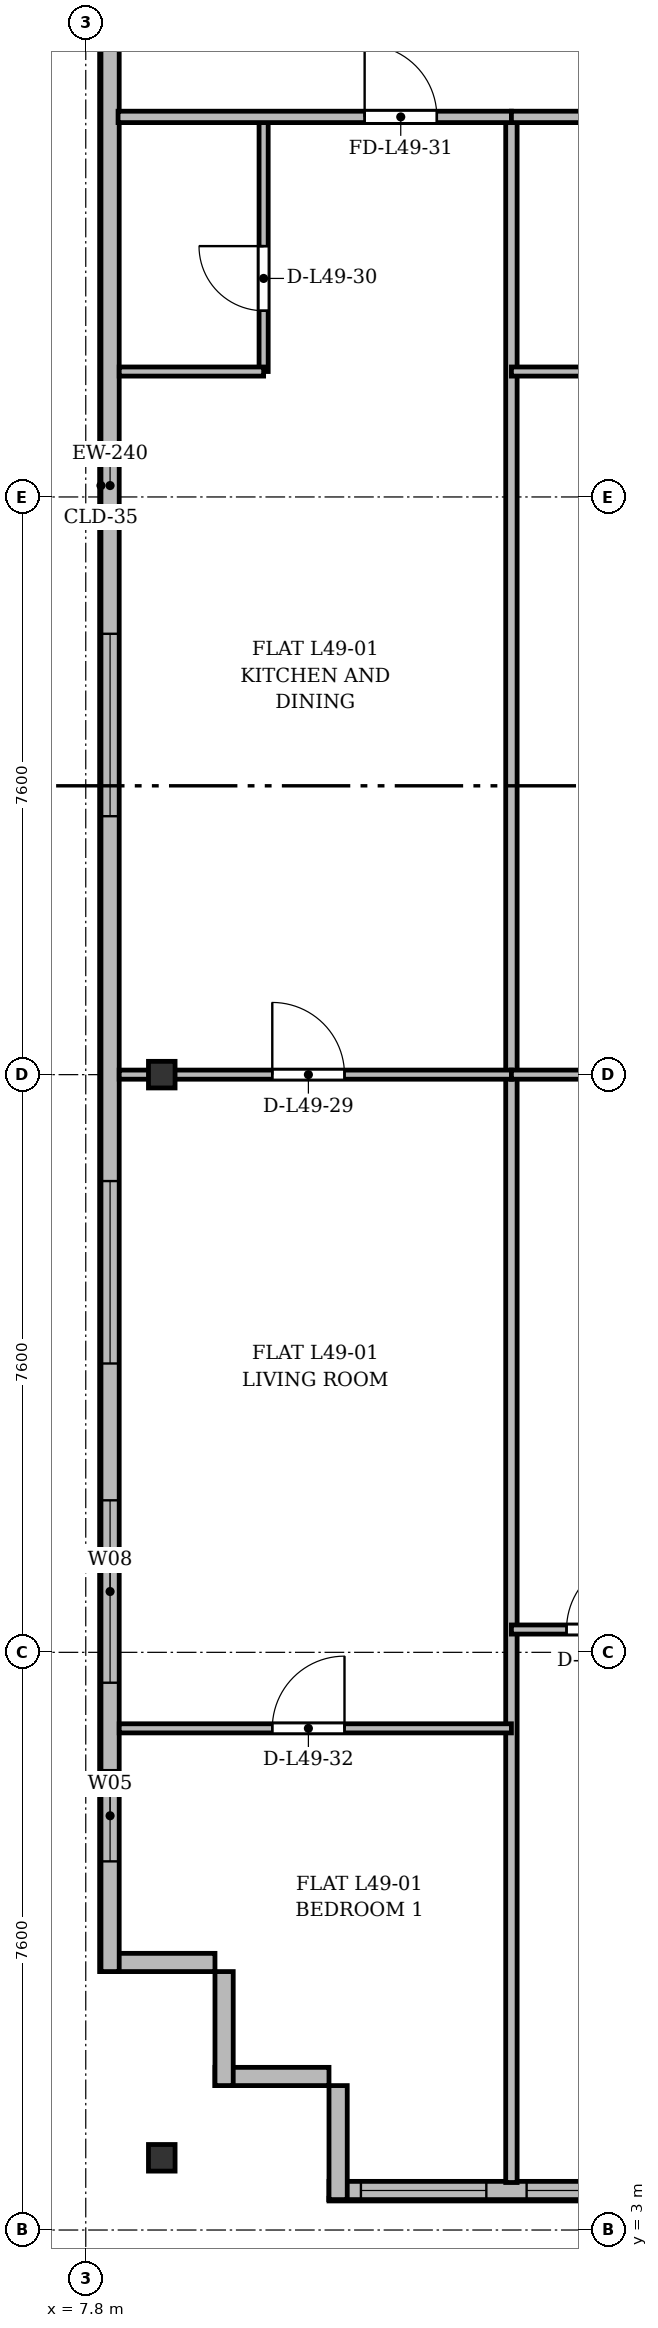
"""IFC4 building model, lengths in metres.
Left out: names, types, materials, properties, quantities, classifications, styles, units other than length and angle.
Written with IfcOpenShell. Run it as: python <this file> out.ifc"""

import sys

from ifc_helpers import new_model, si_unit, direction, frame, frame_2d, origin, origin_2d, place, context, subcontext, project, spatial, rectangle, i_section, extrude, source, transform, mapped, element, fill, save


model = new_model("IFC4")
c1 = context("Model", 3, precision=1e-05, world=origin(), true_north=direction((0.0, 1.0)))
c2 = subcontext(c1, "Body", "Model", "MODEL_VIEW")
j1 = project(units=[si_unit("LENGTHUNIT", "METRE"), si_unit("PLANEANGLEUNIT", "RADIAN")], contexts=[c1])
p1 = place(None, origin())
s1 = spatial("IfcSite", under=j1, at=p1, CompositionType="ELEMENT")
p2 = place(p1, origin())
s2 = spatial("IfcBuilding", under=s1, at=p2, CompositionType="ELEMENT")
p3 = place(p2, frame((0.0, 0.0, 190.5)))
s3 = spatial("IfcBuildingStorey", under=s2, at=p3, CompositionType="ELEMENT", Elevation=190.5)
m1 = source(origin(), c2, "Body", "SweptSolid", [
    extrude(i_section(OverallWidth=0.35, OverallDepth=0.35, WebThickness=0.018, FlangeThickness=0.028, at=origin_2d()), origin(), (0.0, 0.0, 1.0), 3.6),
])
for number, where, z_axis, x_axis in (
    (1, (8.8, 3.95, 0.0), (0.0, 0.0, 1.0), (1.0, 0.0, 0.0)),
    (2, (8.8, 18.2, 0.0), (0.0, 0.0, 1.0), (1.0, 0.0, 0.0)),
):
    element("IfcColumn", number, at=place(p3, frame(where, z_axis=z_axis, x_axis=x_axis)), inside=s3, PredefinedType="COLUMN", context=c2, shape_type="MappedRepresentation", body=[
        mapped(m1, transform((0.0, 0.0, 0.0), x_axis=(1.0, 0.0, 0.0), y_axis=(0.0, 1.0, 0.0), z_axis=(0.0, 0.0, 1.0), scale=1.0)),
    ])
for number, where, z_axis, x_axis in (
    (3, (11.0, 5.02, 0.0), (0.0, 0.0, 1.0), (-1.0, 0.0, 0.0)),
    (4, (9.62, 4.9, 0.0), (0.0, 0.0, 1.0), (0.0, 1.0, 0.0)),
):
    element("IfcWall", number, at=place(p3, frame(where, z_axis=z_axis, x_axis=x_axis)), inside=s3, PredefinedType="SOLIDWALL", context=c2, shape_type="SweptSolid", body=[
        extrude(rectangle(XDim=1.5, YDim=0.24, at=frame_2d((0.75, 0.0))), origin(), (0.0, 0.0, 1.0), 3.36),
    ])
p4 = place(p3, frame((9.5, 6.52, 0.0), z_axis=(0.0, 0.0, 1.0), x_axis=(-1.0, 0.0, 0.0)))
e5 = element("IfcWall", 5, at=p4, inside=s3, PredefinedType="SOLIDWALL", context=c2, shape_type="SweptSolid", body=[
    extrude(rectangle(XDim=1.5, YDim=0.24, at=frame_2d((0.75, 0.0))), origin(), (0.0, 0.0, 1.0), 2.86),
])
p5 = place(p3, frame((8.12, 6.4, 0.0), z_axis=(0.0, 0.0, 1.0), x_axis=(0.0, 1.0, 0.0)))
e6 = element("IfcWall", 6, at=p5, inside=s3, PredefinedType="SOLIDWALL", context=c2, shape_type="SweptSolid", body=[
    extrude(rectangle(XDim=39.1, YDim=0.24, at=frame_2d((19.55, 0.0))), origin(), (0.0, 0.0, 1.0), 3.36),
])
p6 = place(p5, frame((1.45, 0.0, 0.92)))
e7 = element("IfcOpeningElement", 7, at=p6, cuts=e6, PredefinedType="OPENING", context=c2, shape_type="SweptSolid", body=[
    extrude(rectangle(XDim=1.2, YDim=1.65, at=frame_2d((0.6, 0.825))), frame((0.0, 0.13, 0.0), z_axis=(0.0, -1.0, 0.0), x_axis=(1.0, 0.0, 0.0)), (0.0, 0.0, 1.0), 0.26),
])
p7 = place(p5, frame((3.8, 0.0, 0.92)))
e8 = element("IfcOpeningElement", 8, at=p7, cuts=e6, PredefinedType="OPENING", context=c2, shape_type="SweptSolid", body=[
    extrude(rectangle(XDim=2.4, YDim=2.1, at=frame_2d((1.2, 1.05))), frame((0.0, 0.13, 0.0), z_axis=(0.0, -1.0, 0.0), x_axis=(1.0, 0.0, 0.0)), (0.0, 0.0, 1.0), 0.26),
])
p8 = place(p5, frame((8.0, 0.0, 0.92)))
e9 = element("IfcOpeningElement", 9, at=p8, cuts=e6, PredefinedType="OPENING", context=c2, shape_type="SweptSolid", body=[
    extrude(rectangle(XDim=2.4, YDim=2.1, at=frame_2d((1.2, 1.05))), frame((0.0, 0.13, 0.0), z_axis=(0.0, -1.0, 0.0), x_axis=(1.0, 0.0, 0.0)), (0.0, 0.0, 1.0), 0.26),
])
p9 = place(p5, frame((15.2, 0.0, 0.92)))
e10 = element("IfcOpeningElement", 10, at=p9, cuts=e6, PredefinedType="OPENING", context=c2, shape_type="SweptSolid", body=[
    extrude(rectangle(XDim=2.4, YDim=2.1, at=frame_2d((1.2, 1.05))), frame((0.0, 0.13, 0.0), z_axis=(0.0, -1.0, 0.0), x_axis=(1.0, 0.0, 0.0)), (0.0, 0.0, 1.0), 0.26),
])
p10 = place(p5, frame((33.4, 0.0, 0.92)))
e11 = element("IfcOpeningElement", 11, at=p10, cuts=e6, PredefinedType="OPENING", context=c2, shape_type="SweptSolid", body=[
    extrude(rectangle(XDim=1.2, YDim=1.65, at=frame_2d((0.6, 0.825))), frame((0.0, 0.13, 0.0), z_axis=(0.0, -1.0, 0.0), x_axis=(1.0, 0.0, 0.0)), (0.0, 0.0, 1.0), 0.26),
])
p11 = place(p5, frame((36.75, 0.0, 0.92)))
e12 = element("IfcOpeningElement", 12, at=p11, cuts=e6, PredefinedType="OPENING", context=c2, shape_type="SweptSolid", body=[
    extrude(rectangle(XDim=1.2, YDim=1.65, at=frame_2d((0.6, 0.825))), frame((0.0, 0.13, 0.0), z_axis=(0.0, -1.0, 0.0), x_axis=(1.0, 0.0, 0.0)), (0.0, 0.0, 1.0), 0.26),
])
p12 = place(p3, frame((30.6, 3.52, 0.0), z_axis=(0.0, 0.0, 1.0), x_axis=(-1.0, 0.0, 0.0)))
e13 = element("IfcWall", 13, at=p12, inside=s3, PredefinedType="SOLIDWALL", context=c2, shape_type="SweptSolid", body=[
    extrude(rectangle(XDim=19.6, YDim=0.24, at=frame_2d((9.8, 0.0))), origin(), (0.0, 0.0, 1.0), 3.36),
])
p13 = place(p12, frame((1.82, 0.0, 0.9)))
e14 = element("IfcOpeningElement", 14, at=p13, cuts=e13, PredefinedType="OPENING", context=c2, shape_type="SweptSolid", body=[
    extrude(rectangle(XDim=1.65, YDim=1.85, at=frame_2d((0.825, 0.925))), frame((0.0, 0.13, 0.0), z_axis=(0.0, -1.0, 0.0), x_axis=(1.0, 0.0, 0.0)), (0.0, 0.0, 1.0), 0.26),
])
p14 = place(p12, frame((6.9, 0.0, 0.9)))
e15 = element("IfcOpeningElement", 15, at=p14, cuts=e13, PredefinedType="OPENING", context=c2, shape_type="SweptSolid", body=[
    extrude(rectangle(XDim=1.8, YDim=1.8, at=frame_2d((0.9, 0.9))), frame((0.0, 0.13, 0.0), z_axis=(0.0, -1.0, 0.0), x_axis=(1.0, 0.0, 0.0)), (0.0, 0.0, 1.0), 0.26),
])
p15 = place(p12, frame((10.855, 0.0, 0.0)))
e16 = element("IfcOpeningElement", 16, at=p15, cuts=e13, PredefinedType="OPENING", context=c2, shape_type="SweptSolid", body=[
    extrude(rectangle(XDim=1.2, YDim=2.2, at=frame_2d((0.6, 1.1))), frame((0.0, 0.13, 0.0), z_axis=(0.0, -1.0, 0.0), x_axis=(1.0, 0.0, 0.0)), (0.0, 0.0, 1.0), 0.26),
])
p16 = place(p12, frame((12.85, 0.0, 0.9)))
e17 = element("IfcOpeningElement", 17, at=p16, cuts=e13, PredefinedType="OPENING", context=c2, shape_type="SweptSolid", body=[
    extrude(rectangle(XDim=1.5, YDim=1.75, at=frame_2d((0.75, 0.875))), frame((0.0, 0.13, 0.0), z_axis=(0.0, -1.0, 0.0), x_axis=(1.0, 0.0, 0.0)), (0.0, 0.0, 1.0), 0.26),
])
p17 = place(p12, frame((15.0, 0.0, 0.9)))
e18 = element("IfcOpeningElement", 18, at=p17, cuts=e13, PredefinedType="OPENING", context=c2, shape_type="SweptSolid", body=[
    extrude(rectangle(XDim=2.0, YDim=1.95, at=frame_2d((1.0, 0.975))), frame((0.0, 0.13, 0.0), z_axis=(0.0, -1.0, 0.0), x_axis=(1.0, 0.0, 0.0)), (0.0, 0.0, 1.0), 0.26),
])
p18 = place(p12, frame((17.53, 0.0, 0.9)))
e19 = element("IfcOpeningElement", 19, at=p18, cuts=e13, PredefinedType="OPENING", context=c2, shape_type="SweptSolid", body=[
    extrude(rectangle(XDim=1.65, YDim=1.85, at=frame_2d((0.825, 0.925))), frame((0.0, 0.13, 0.0), z_axis=(0.0, -1.0, 0.0), x_axis=(1.0, 0.0, 0.0)), (0.0, 0.0, 1.0), 0.26),
])
p19 = place(p3, frame((11.12, 3.4, 0.0), z_axis=(0.0, 0.0, 1.0), x_axis=(0.0, 1.0, 0.0)))
e20 = element("IfcWall", 20, at=p19, inside=s3, PredefinedType="SOLIDWALL", context=c2, shape_type="SweptSolid", body=[
    extrude(rectangle(XDim=1.5, YDim=0.24, at=frame_2d((0.75, 0.0))), origin(), (0.0, 0.0, 1.0), 2.91),
])
p20 = place(p3, frame((13.4, 3.625, 0.0), z_axis=(0.0, 0.0, 1.0), x_axis=(0.0, 1.0, 0.0)))
e21 = element("IfcWall", 21, at=p20, inside=s3, PredefinedType="PARTITIONING", context=c2, shape_type="SweptSolid", body=[
    extrude(rectangle(XDim=27.175, YDim=0.15, at=frame_2d((13.587, 0.0))), origin(), (0.0, 0.0, 1.0), 2.91),
])
p21 = place(p3, frame((8.24, 18.2, 0.0), z_axis=(0.0, 0.0, 1.0), x_axis=(1.0, 0.0, 0.0)))
e22 = element("IfcWall", 22, at=p21, inside=s3, PredefinedType="PARTITIONING", context=c2, shape_type="SweptSolid", body=[
    extrude(rectangle(XDim=5.16, YDim=0.12, at=frame_2d((2.58, 0.0))), origin(), (0.0, 0.0, 1.0), 2.91),
])
p22 = place(p21, frame((2.014, 0.0, 0.0)))
e23 = element("IfcOpeningElement", 23, at=p22, cuts=e22, PredefinedType="OPENING", context=c2, shape_type="SweptSolid", body=[
    extrude(rectangle(XDim=0.95, YDim=2.15, at=frame_2d((0.475, 1.075))), frame((0.0, 0.07, 0.0), z_axis=(0.0, -1.0, 0.0), x_axis=(1.0, 0.0, 0.0)), (0.0, 0.0, 1.0), 0.14),
])
p23 = place(p3, frame((10.14, 27.45, 0.0), z_axis=(0.0, 0.0, 1.0), x_axis=(0.0, 1.0, 0.0)))
e24 = element("IfcWall", 24, at=p23, inside=s3, PredefinedType="PARTITIONING", context=c2, shape_type="SweptSolid", body=[
    extrude(rectangle(XDim=3.35, YDim=0.12, at=frame_2d((1.675, 0.0))), origin(), (0.0, 0.0, 1.0), 3.36),
])
p24 = place(p23, frame((0.8, 0.0, 0.0)))
e25 = element("IfcOpeningElement", 25, at=p24, cuts=e24, PredefinedType="OPENING", context=c2, shape_type="SweptSolid", body=[
    extrude(rectangle(XDim=0.85, YDim=2.1, at=frame_2d((0.425, 1.05))), frame((0.0, 0.07, 0.0), z_axis=(0.0, -1.0, 0.0), x_axis=(1.0, 0.0, 0.0)), (0.0, 0.0, 1.0), 0.14),
])
p25 = place(p3, frame((8.24, 27.45, 0.0), z_axis=(0.0, 0.0, 1.0), x_axis=(1.0, 0.0, 0.0)))
e26 = element("IfcWall", 26, at=p25, inside=s3, PredefinedType="PARTITIONING", context=c2, shape_type="SweptSolid", body=[
    extrude(rectangle(XDim=1.9, YDim=0.12, at=frame_2d((0.95, 0.0))), origin(), (0.0, 0.0, 1.0), 2.86),
])
p26 = place(p3, frame((8.225, 30.8, 0.0), z_axis=(0.0, 0.0, 1.0), x_axis=(1.0, 0.0, 0.0)))
e27 = element("IfcWall", 27, at=p26, inside=s3, PredefinedType="PARTITIONING", context=c2, shape_type="SweptSolid", body=[
    extrude(rectangle(XDim=5.175, YDim=0.15, at=frame_2d((2.587, 0.0))), origin(), (0.0, 0.0, 1.0), 2.86),
])
p27 = place(p26, frame((3.244, 0.0, 0.0)))
e28 = element("IfcOpeningElement", 28, at=p27, cuts=e27, PredefinedType="OPENING", context=c2, shape_type="SweptSolid", body=[
    extrude(rectangle(XDim=0.95, YDim=2.15, at=frame_2d((0.475, 1.075))), frame((0.0, 0.085, 0.0), z_axis=(0.0, -1.0, 0.0), x_axis=(1.0, 0.0, 0.0)), (0.0, 0.0, 1.0), 0.17),
])
p28 = place(p3, frame((8.24, 9.6, 0.0), z_axis=(0.0, 0.0, 1.0), x_axis=(1.0, 0.0, 0.0)))
e29 = element("IfcWall", 29, at=p28, inside=s3, PredefinedType="PARTITIONING", context=c2, shape_type="SweptSolid", body=[
    extrude(rectangle(XDim=5.16, YDim=0.12, at=frame_2d((2.58, 0.0))), origin(), (0.0, 0.0, 1.0), 2.86),
])
p29 = place(p28, frame((2.014, 0.0, 0.0)))
e30 = element("IfcOpeningElement", 30, at=p29, cuts=e29, PredefinedType="OPENING", context=c2, shape_type="SweptSolid", body=[
    extrude(rectangle(XDim=0.95, YDim=2.15, at=frame_2d((0.475, 1.075))), frame((0.0, 0.07, 0.0), z_axis=(0.0, -1.0, 0.0), x_axis=(1.0, 0.0, 0.0)), (0.0, 0.0, 1.0), 0.14),
])
p30 = place(p3, frame((13.4, 18.2, 0.0), z_axis=(0.0, 0.0, 1.0), x_axis=(1.0, 0.0, 0.0)))
e31 = element("IfcWall", 31, at=p30, inside=s3, PredefinedType="PARTITIONING", context=c2, shape_type="SweptSolid", body=[
    extrude(rectangle(XDim=4.8, YDim=0.12, at=frame_2d((2.4, 0.0))), origin(), (0.0, 0.0, 1.0), 2.91),
])
p31 = place(p30, frame((3.288, 0.0, 0.0)))
e32 = element("IfcOpeningElement", 32, at=p31, cuts=e31, PredefinedType="OPENING", context=c2, shape_type="SweptSolid", body=[
    extrude(rectangle(XDim=0.95, YDim=2.15, at=frame_2d((0.475, 1.075))), frame((0.0, 0.07, 0.0), z_axis=(0.0, -1.0, 0.0), x_axis=(1.0, 0.0, 0.0)), (0.0, 0.0, 1.0), 0.14),
])
p32 = place(p3, frame((13.4, 27.45, 0.0), z_axis=(0.0, 0.0, 1.0), x_axis=(1.0, 0.0, 0.0)))
e33 = element("IfcWall", 33, at=p32, inside=s3, PredefinedType="PARTITIONING", context=c2, shape_type="SweptSolid", body=[
    extrude(rectangle(XDim=1.9, YDim=0.12, at=frame_2d((0.95, 0.0))), origin(), (0.0, 0.0, 1.0), 3.36),
])
p33 = place(p3, frame((13.4, 30.8, 0.0), z_axis=(0.0, 0.0, 1.0), x_axis=(1.0, 0.0, 0.0)))
e34 = element("IfcWall", 34, at=p33, inside=s3, PredefinedType="PARTITIONING", context=c2, shape_type="SweptSolid", body=[
    extrude(rectangle(XDim=4.8, YDim=0.15, at=frame_2d((2.4, 0.0))), origin(), (0.0, 0.0, 1.0), 2.86),
])
p34 = place(p33, frame((3.019, 0.0, 0.0)))
e35 = element("IfcOpeningElement", 35, at=p34, cuts=e34, PredefinedType="OPENING", context=c2, shape_type="SweptSolid", body=[
    extrude(rectangle(XDim=0.95, YDim=2.15, at=frame_2d((0.475, 1.075))), frame((0.0, 0.085, 0.0), z_axis=(0.0, -1.0, 0.0), x_axis=(1.0, 0.0, 0.0)), (0.0, 0.0, 1.0), 0.17),
])
p35 = place(p3, frame((13.4, 10.9, 0.0), z_axis=(0.0, 0.0, 1.0), x_axis=(1.0, 0.0, 0.0)))
e36 = element("IfcWall", 36, at=p35, inside=s3, PredefinedType="PARTITIONING", context=c2, shape_type="SweptSolid", body=[
    extrude(rectangle(XDim=2.4, YDim=0.12, at=frame_2d((1.2, 0.0))), origin(), (0.0, 0.0, 1.0), 2.86),
])
p36 = place(p35, frame((0.725, 0.0, 0.0)))
e37 = element("IfcOpeningElement", 37, at=p36, cuts=e36, PredefinedType="OPENING", context=c2, shape_type="SweptSolid", body=[
    extrude(rectangle(XDim=0.95, YDim=2.15, at=frame_2d((0.475, 1.075))), frame((0.0, 0.07, 0.0), z_axis=(0.0, -1.0, 0.0), x_axis=(1.0, 0.0, 0.0)), (0.0, 0.0, 1.0), 0.14),
])
m2 = source(origin(), c2, "Body", "SweptSolid", [
    extrude(rectangle(XDim=1.2, YDim=1.65, at=frame_2d((0.6, 0.825))), frame((0.0, 0.03, 0.0), z_axis=(0.0, -1.0, 0.0), x_axis=(1.0, 0.0, 0.0)), (0.0, 0.0, 1.0), 0.06),
])
p37 = place(p6, origin())
e38 = element("IfcWindow", 38, at=p37, inside=s3, PartitioningType="SINGLE_PANEL", PredefinedType="WINDOW", context=c2, shape_type="MappedRepresentation", body=[
    mapped(m2, transform((0.0, 0.0, 0.0), x_axis=(1.0, 0.0, 0.0), y_axis=(0.0, 1.0, 0.0), z_axis=(0.0, 0.0, 1.0), scale=1.0)),
])
fill(e7, e38)
m3 = source(origin(), c2, "Body", "SweptSolid", [
    extrude(rectangle(XDim=2.4, YDim=2.1, at=frame_2d((1.2, 1.05))), frame((0.0, 0.03, 0.0), z_axis=(0.0, -1.0, 0.0), x_axis=(1.0, 0.0, 0.0)), (0.0, 0.0, 1.0), 0.06),
])
p38 = place(p7, origin())
e39 = element("IfcWindow", 39, at=p38, inside=s3, PartitioningType="SINGLE_PANEL", PredefinedType="WINDOW", context=c2, shape_type="MappedRepresentation", body=[
    mapped(m3, transform((0.0, 0.0, 0.0), x_axis=(1.0, 0.0, 0.0), y_axis=(0.0, 1.0, 0.0), z_axis=(0.0, 0.0, 1.0), scale=1.0)),
])
fill(e8, e39)
p39 = place(p8, origin())
e40 = element("IfcWindow", 40, at=p39, inside=s3, PartitioningType="SINGLE_PANEL", PredefinedType="WINDOW", context=c2, shape_type="MappedRepresentation", body=[
    mapped(m3, transform((0.0, 0.0, 0.0), x_axis=(1.0, 0.0, 0.0), y_axis=(0.0, 1.0, 0.0), z_axis=(0.0, 0.0, 1.0), scale=1.0)),
])
fill(e9, e40)
p40 = place(p9, origin())
e41 = element("IfcWindow", 41, at=p40, inside=s3, PartitioningType="SINGLE_PANEL", PredefinedType="WINDOW", context=c2, shape_type="MappedRepresentation", body=[
    mapped(m3, transform((0.0, 0.0, 0.0), x_axis=(1.0, 0.0, 0.0), y_axis=(0.0, 1.0, 0.0), z_axis=(0.0, 0.0, 1.0), scale=1.0)),
])
fill(e10, e41)
m4 = source(origin(), c2, "Body", "SweptSolid", [
    extrude(rectangle(XDim=2.0, YDim=1.95, at=frame_2d((1.0, 0.975))), frame((0.0, 0.03, 0.0), z_axis=(0.0, -1.0, 0.0), x_axis=(1.0, 0.0, 0.0)), (0.0, 0.0, 1.0), 0.06),
])
p41 = place(p17, origin())
e42 = element("IfcWindow", 42, at=p41, inside=s3, PartitioningType="SINGLE_PANEL", PredefinedType="WINDOW", context=c2, shape_type="MappedRepresentation", body=[
    mapped(m4, transform((0.0, 0.0, 0.0), x_axis=(1.0, 0.0, 0.0), y_axis=(0.0, 1.0, 0.0), z_axis=(0.0, 0.0, 1.0), scale=1.0)),
])
fill(e18, e42)
m5 = source(origin(), c2, "Body", "SweptSolid", [
    extrude(rectangle(XDim=1.65, YDim=1.85, at=frame_2d((0.825, 0.925))), frame((0.0, 0.03, 0.0), z_axis=(0.0, -1.0, 0.0), x_axis=(1.0, 0.0, 0.0)), (0.0, 0.0, 1.0), 0.06),
])
p42 = place(p18, origin())
e43 = element("IfcWindow", 43, at=p42, inside=s3, PartitioningType="SINGLE_PANEL", PredefinedType="WINDOW", context=c2, shape_type="MappedRepresentation", body=[
    mapped(m5, transform((0.0, 0.0, 0.0), x_axis=(1.0, 0.0, 0.0), y_axis=(0.0, 1.0, 0.0), z_axis=(0.0, 0.0, 1.0), scale=1.0)),
])
fill(e19, e43)
m6 = source(origin(), c2, "Body", "SweptSolid", [
    extrude(rectangle(XDim=0.95, YDim=2.15, at=frame_2d((0.475, 1.075))), frame((0.0, 0.025, 0.0), z_axis=(0.0, -1.0, 0.0), x_axis=(1.0, 0.0, 0.0)), (0.0, 0.0, 1.0), 0.05),
])
p43 = place(p22, origin())
e44 = element("IfcDoor", 44, at=p43, inside=s3, OperationType="SINGLE_SWING_LEFT", PredefinedType="DOOR", context=c2, shape_type="MappedRepresentation", body=[
    mapped(m6, transform((0.0, 0.0, 0.0), x_axis=(1.0, 0.0, 0.0), y_axis=(0.0, 1.0, 0.0), z_axis=(0.0, 0.0, 1.0), scale=1.0)),
])
fill(e23, e44)
m7 = source(origin(), c2, "Body", "SweptSolid", [
    extrude(rectangle(XDim=0.85, YDim=2.1, at=frame_2d((0.425, 1.05))), frame((0.0, 0.025, 0.0), z_axis=(0.0, -1.0, 0.0), x_axis=(1.0, 0.0, 0.0)), (0.0, 0.0, 1.0), 0.05),
])
p44 = place(p24, origin())
e45 = element("IfcDoor", 45, at=p44, inside=s3, OperationType="SINGLE_SWING_RIGHT", PredefinedType="DOOR", context=c2, shape_type="MappedRepresentation", body=[
    mapped(m7, transform((0.0, 0.0, 0.0), x_axis=(1.0, 0.0, 0.0), y_axis=(0.0, 1.0, 0.0), z_axis=(0.0, 0.0, 1.0), scale=1.0)),
])
fill(e25, e45)
p45 = place(p27, origin())
e46 = element("IfcDoor", 46, at=p45, inside=s3, OperationType="SINGLE_SWING_LEFT", PredefinedType="DOOR", context=c2, shape_type="MappedRepresentation", body=[
    mapped(m6, transform((0.0, 0.0, 0.0), x_axis=(1.0, 0.0, 0.0), y_axis=(0.0, 1.0, 0.0), z_axis=(0.0, 0.0, 1.0), scale=1.0)),
])
fill(e28, e46)
p46 = place(p29, origin())
e47 = element("IfcDoor", 47, at=p46, inside=s3, OperationType="SINGLE_SWING_RIGHT", PredefinedType="DOOR", context=c2, shape_type="MappedRepresentation", body=[
    mapped(m6, transform((0.0, 0.0, 0.0), x_axis=(1.0, 0.0, 0.0), y_axis=(0.0, 1.0, 0.0), z_axis=(0.0, 0.0, 1.0), scale=1.0)),
])
fill(e30, e47)
p47 = place(p36, origin())
e48 = element("IfcDoor", 48, at=p47, inside=s3, OperationType="SINGLE_SWING_RIGHT", PredefinedType="DOOR", context=c2, shape_type="MappedRepresentation", body=[
    mapped(m6, transform((0.0, 0.0, 0.0), x_axis=(1.0, 0.0, 0.0), y_axis=(0.0, 1.0, 0.0), z_axis=(0.0, 0.0, 1.0), scale=1.0)),
])
fill(e37, e48)
save(model, sys.argv[1])
